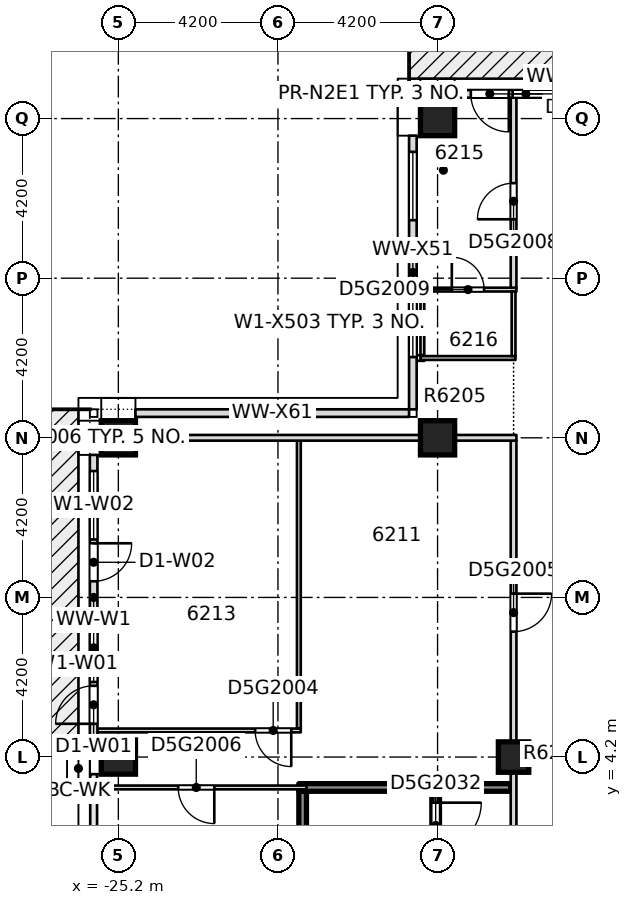
"""IFC4 building model, lengths in metres.
Left out: names, types, materials, properties, quantities, classifications, styles, units other than length and angle.
Written with IfcOpenShell. Run it as: python <this file> out.ifc"""

import sys

from ifc_helpers import new_model, si_unit, direction, frame, frame_2d, origin, origin_2d, place, context, subcontext, project, spatial, rectangle, extrude, element, fill, save


model = new_model("IFC4")
c1 = context("Model", 3, precision=1e-05, world=origin(), true_north=direction((0.0, 1.0)))
c2 = subcontext(c1, "Body", "Model", "MODEL_VIEW")
j1 = project(units=[si_unit("LENGTHUNIT", "METRE"), si_unit("PLANEANGLEUNIT", "RADIAN")], contexts=[c1])
p1 = place(None, origin())
s1 = spatial("IfcSite", under=j1, at=p1, CompositionType="ELEMENT")
p2 = place(p1, origin())
s2 = spatial("IfcBuilding", under=s1, at=p2, CompositionType="ELEMENT")
p3 = place(p2, frame((0.0, 0.0, 237.25)))
s3 = spatial("IfcBuildingStorey", under=s2, at=p3, CompositionType="ELEMENT", Elevation=237.25)
for number, where, z_axis, x_axis in (
    (1, (-25.2, 4.2, -0.4), (0.0, 0.0, 1.0), (1.0, 0.0, 0.0)),
    (2, (-25.2, 12.6, -0.4), (0.0, 0.0, 1.0), (1.0, 0.0, 0.0)),
    (3, (-16.8, 12.6, -0.4), (0.0, 0.0, 1.0), (1.0, 0.0, 0.0)),
    (4, (-16.8, 21.0, -0.4), (0.0, 0.0, 1.0), (1.0, 0.0, 0.0)),
):
    element("IfcColumn", number, at=place(p3, frame(where, z_axis=z_axis, x_axis=x_axis)), inside=s3, PredefinedType="COLUMN", context=c2, shape_type="SweptSolid", body=[
        extrude(rectangle(XDim=0.9, YDim=0.9, at=origin_2d()), origin(), (0.0, 0.0, 1.0), 3.45),
    ])
p4 = place(p3, frame((-14.8, 4.2, -0.4), z_axis=(0.0, 0.0, 1.0), x_axis=(1.0, 0.0, 0.0)))
e5 = element("IfcColumn", 5, at=p4, inside=s3, PredefinedType="COLUMN", context=c2, shape_type="SweptSolid", body=[
    extrude(rectangle(XDim=0.8, YDim=0.8, at=origin_2d()), origin(), (0.0, 0.0, 1.0), 3.45),
])
p5 = place(p3, frame((-25.75, 3.4, 0.0), z_axis=(0.0, 0.0, 1.0), x_axis=(1.0, 0.0, 0.0)))
e6 = element("IfcWall", 6, at=p5, inside=s3, PredefinedType="PARTITIONING", context=c2, shape_type="SweptSolid", body=[
    extrude(rectangle(XDim=5.5, YDim=0.1, at=frame_2d((2.75, 0.0))), origin(), (0.0, 0.0, 1.0), 3.05),
])
p6 = place(p5, frame((2.125, 0.0, 0.0)))
e7 = element("IfcOpeningElement", 7, at=p6, cuts=e6, PredefinedType="OPENING", context=c2, shape_type="SweptSolid", body=[
    extrude(rectangle(XDim=0.95, YDim=2.1, at=frame_2d((0.475, 1.05))), frame((0.0, 0.06, 0.0), z_axis=(0.0, -1.0, 0.0), x_axis=(1.0, 0.0, 0.0)), (0.0, 0.0, 1.0), 0.12),
])
p7 = place(p3, frame((-20.45, 3.4, 0.0), z_axis=(0.0, 0.0, 1.0), x_axis=(1.0, 0.0, 0.0)))
e8 = element("IfcWall", 8, at=p7, inside=s3, PredefinedType="SOLIDWALL", context=c2, shape_type="SweptSolid", body=[
    extrude(rectangle(XDim=5.575, YDim=0.2, at=frame_2d((2.788, 0.0))), origin(), (0.0, 0.0, 1.0), 3.05),
])
p8 = place(p3, frame((-25.75, 4.9, 0.0), z_axis=(0.0, 0.0, 1.0), x_axis=(1.0, 0.0, 0.0)))
e9 = element("IfcWall", 9, at=p8, inside=s3, PredefinedType="PARTITIONING", context=c2, shape_type="SweptSolid", body=[
    extrude(rectangle(XDim=5.35, YDim=0.1, at=frame_2d((2.675, 0.0))), origin(), (0.0, 0.0, 1.0), 3.05),
])
p9 = place(p8, frame((4.15, 0.0, 0.0)))
e10 = element("IfcOpeningElement", 10, at=p9, cuts=e9, PredefinedType="OPENING", context=c2, shape_type="SweptSolid", body=[
    extrude(rectangle(XDim=0.95, YDim=2.1, at=frame_2d((0.475, 1.05))), frame((0.0, 0.06, 0.0), z_axis=(0.0, -1.0, 0.0), x_axis=(1.0, 0.0, 0.0)), (0.0, 0.0, 1.0), 0.12),
])
p10 = place(p3, frame((-25.75, 12.6, 0.0), z_axis=(0.0, 0.0, 1.0), x_axis=(1.0, 0.0, 0.0)))
e11 = element("IfcWall", 11, at=p10, inside=s3, PredefinedType="PARTITIONING", context=c2, shape_type="SweptSolid", body=[
    extrude(rectangle(XDim=1.0, YDim=0.15, at=frame_2d((0.5, 0.0))), origin(), (0.0, 0.0, 1.0), 3.05),
])
p11 = place(p3, frame((-17.35, 14.7, 0.0), z_axis=(0.0, 0.0, 1.0), x_axis=(1.0, 0.0, 0.0)))
e12 = element("IfcWall", 12, at=p11, inside=s3, PredefinedType="PARTITIONING", context=c2, shape_type="SweptSolid", body=[
    extrude(rectangle(XDim=0.2, YDim=0.15, at=frame_2d((0.1, 0.0))), origin(), (0.0, 0.0, 1.0), 3.05),
])
p12 = place(p3, frame((-17.25, 14.7, 0.0), z_axis=(0.0, 0.0, 1.0), x_axis=(1.0, 0.0, 0.0)))
e13 = element("IfcWall", 13, at=p12, inside=s3, PredefinedType="PARTITIONING", context=c2, shape_type="SweptSolid", body=[
    extrude(rectangle(XDim=2.5, YDim=0.1, at=frame_2d((1.25, 0.0))), origin(), (0.0, 0.0, 1.0), 3.05),
])
p13 = place(p3, frame((-17.25, 16.5, 0.0), z_axis=(0.0, 0.0, 1.0), x_axis=(1.0, 0.0, 0.0)))
e14 = element("IfcWall", 14, at=p13, inside=s3, PredefinedType="PARTITIONING", context=c2, shape_type="SweptSolid", body=[
    extrude(rectangle(XDim=2.525, YDim=0.1, at=frame_2d((1.262, 0.0))), origin(), (0.0, 0.0, 1.0), 3.05),
])
p14 = place(p13, frame((0.825, 0.0, 0.0)))
e15 = element("IfcOpeningElement", 15, at=p14, cuts=e14, PredefinedType="OPENING", context=c2, shape_type="SweptSolid", body=[
    extrude(rectangle(XDim=0.85, YDim=2.1, at=frame_2d((0.425, 1.05))), frame((0.0, 0.06, 0.0), z_axis=(0.0, -1.0, 0.0), x_axis=(1.0, 0.0, 0.0)), (0.0, 0.0, 1.0), 0.12),
])
p15 = place(p3, frame((-20.45, 4.95, 0.0), z_axis=(0.0, 0.0, 1.0), x_axis=(0.0, 1.0, 0.0)))
e16 = element("IfcWall", 16, at=p15, inside=s3, PredefinedType="PARTITIONING", context=c2, shape_type="SweptSolid", body=[
    extrude(rectangle(XDim=7.575, YDim=0.1, at=frame_2d((3.788, 0.0))), origin(), (0.0, 0.0, 1.0), 3.05),
])
p16 = place(p3, frame((-20.35, 0.07, 0.0), z_axis=(0.0, 0.0, 1.0), x_axis=(0.0, 1.0, 0.0)))
e17 = element("IfcWall", 17, at=p16, inside=s3, PredefinedType="SOLIDWALL", context=c2, shape_type="SweptSolid", body=[
    extrude(rectangle(XDim=3.23, YDim=0.2, at=frame_2d((1.615, 0.0))), origin(), (0.0, 0.0, 1.0), 3.05),
])
p17 = place(p3, frame((-17.2, 14.775, 0.0), z_axis=(0.0, 0.0, 1.0), x_axis=(0.0, 1.0, 0.0)))
e18 = element("IfcWall", 18, at=p17, inside=s3, PredefinedType="PARTITIONING", context=c2, shape_type="SweptSolid", body=[
    extrude(rectangle(XDim=1.675, YDim=0.1, at=frame_2d((0.837, 0.0))), origin(), (0.0, 0.0, 1.0), 3.05),
])
p18 = place(p3, frame((-16.85, -3.3, 0.0), z_axis=(0.0, 0.0, 1.0), x_axis=(0.0, 1.0, 0.0)))
e19 = element("IfcWall", 19, at=p18, inside=s3, PredefinedType="SOLIDWALL", context=c2, shape_type="SweptSolid", body=[
    extrude(rectangle(XDim=6.6, YDim=0.2, at=frame_2d((3.3, 0.0))), origin(), (0.0, 0.0, 1.0), 3.05),
])
p19 = place(p18, frame((5.1, 0.0, 0.0)))
e20 = element("IfcOpeningElement", 20, at=p19, cuts=e19, PredefinedType="OPENING", context=c2, shape_type="SweptSolid", body=[
    extrude(rectangle(XDim=1.2, YDim=2.1, at=frame_2d((0.6, 1.05))), frame((0.0, 0.11, 0.0), z_axis=(0.0, -1.0, 0.0), x_axis=(1.0, 0.0, 0.0)), (0.0, 0.0, 1.0), 0.22),
])
p20 = place(p3, frame((-14.8, -5.223, 0.0), z_axis=(0.0, 0.0, 1.0), x_axis=(0.0, 1.0, 0.0)))
e21 = element("IfcWall", 21, at=p20, inside=s3, PredefinedType="PARTITIONING", context=c2, shape_type="SweptSolid", body=[
    extrude(rectangle(XDim=17.748, YDim=0.15, at=frame_2d((8.874, 0.0))), origin(), (0.0, 0.0, 1.0), 3.05),
])
p21 = place(p20, frame((12.723, 0.0, 0.0)))
e22 = element("IfcOpeningElement", 22, at=p21, cuts=e21, PredefinedType="OPENING", context=c2, shape_type="SweptSolid", body=[
    extrude(rectangle(XDim=1.0, YDim=2.1, at=frame_2d((0.5, 1.05))), frame((0.0, 0.085, 0.0), z_axis=(0.0, -1.0, 0.0), x_axis=(1.0, 0.0, 0.0)), (0.0, 0.0, 1.0), 0.17),
])
p22 = place(p20, frame((4.673, 0.0, 0.0)))
e23 = element("IfcOpeningElement", 23, at=p22, cuts=e21, PredefinedType="OPENING", context=c2, shape_type="SweptSolid", body=[
    extrude(rectangle(XDim=1.1, YDim=2.1, at=frame_2d((0.55, 1.05))), frame((0.0, 0.085, 0.0), z_axis=(0.0, -1.0, 0.0), x_axis=(1.0, 0.0, 0.0)), (0.0, 0.0, 1.0), 0.17),
])
p23 = place(p3, frame((-14.8, 14.75, 0.0), z_axis=(0.0, 0.0, 1.0), x_axis=(0.0, 1.0, 0.0)))
e24 = element("IfcWall", 24, at=p23, inside=s3, PredefinedType="PARTITIONING", context=c2, shape_type="SweptSolid", body=[
    extrude(rectangle(XDim=1.7, YDim=0.1, at=frame_2d((0.85, 0.0))), origin(), (0.0, 0.0, 1.0), 3.05),
])
p24 = place(p3, frame((-14.8, 16.55, 0.0), z_axis=(0.0, 0.0, 1.0), x_axis=(0.0, 1.0, 0.0)))
e25 = element("IfcWall", 25, at=p24, inside=s3, PredefinedType="PARTITIONING", context=c2, shape_type="SweptSolid", body=[
    extrude(rectangle(XDim=5.0, YDim=0.15, at=frame_2d((2.5, 0.0))), origin(), (0.0, 0.0, 1.0), 3.05),
])
p25 = place(p24, frame((1.8, 0.0, 0.0)))
e26 = element("IfcOpeningElement", 26, at=p25, cuts=e25, PredefinedType="OPENING", context=c2, shape_type="SweptSolid", body=[
    extrude(rectangle(XDim=0.95, YDim=2.1, at=frame_2d((0.475, 1.05))), frame((0.0, 0.085, 0.0), z_axis=(0.0, -1.0, 0.0), x_axis=(1.0, 0.0, 0.0)), (0.0, 0.0, 1.0), 0.17),
])
p26 = place(p3, frame((-12.6, 21.65, 0.0), z_axis=(0.0, 0.0, 1.0), x_axis=(-1.0, 0.0, 0.0)))
e27 = element("IfcWall", 27, at=p26, inside=s3, PredefinedType="STANDARD", context=c2, shape_type="SweptSolid", body=[
    extrude(rectangle(XDim=3.75, YDim=0.2, at=frame_2d((1.875, 0.0))), origin(), (0.0, 0.0, 1.0), 3.05),
])
p27 = place(p26, frame((0.425, 0.0, 0.2)))
e28 = element("IfcOpeningElement", 28, at=p27, cuts=e27, PredefinedType="OPENING", context=c2, shape_type="SweptSolid", body=[
    extrude(rectangle(XDim=1.8, YDim=2.65, at=frame_2d((0.9, 1.325))), frame((0.0, 0.11, 0.0), z_axis=(0.0, -1.0, 0.0), x_axis=(1.0, 0.0, 0.0)), (0.0, 0.0, 1.0), 0.22),
])
p28 = place(p26, frame((2.325, 0.0, 0.0)))
e29 = element("IfcOpeningElement", 29, at=p28, cuts=e27, PredefinedType="OPENING", context=c2, shape_type="SweptSolid", body=[
    extrude(rectangle(XDim=1.0, YDim=2.4, at=frame_2d((0.5, 1.2))), frame((0.0, 0.11, 0.0), z_axis=(0.0, -1.0, 0.0), x_axis=(1.0, 0.0, 0.0)), (0.0, 0.0, 1.0), 0.22),
])
p29 = place(p3, frame((-17.45, 20.55, 0.0), z_axis=(0.0, 0.0, 1.0), x_axis=(0.0, -1.0, 0.0)))
e30 = element("IfcWall", 30, at=p29, inside=s3, PredefinedType="STANDARD", context=c2, shape_type="SweptSolid", body=[
    extrude(rectangle(XDim=7.2, YDim=0.2, at=frame_2d((3.6, 0.0))), origin(), (0.0, 0.0, 1.0), 3.05),
])
p30 = place(p29, frame((4.025, 0.0, 0.2)))
e31 = element("IfcOpeningElement", 31, at=p30, cuts=e30, PredefinedType="OPENING", context=c2, shape_type="SweptSolid", body=[
    extrude(rectangle(XDim=1.8, YDim=2.65, at=frame_2d((0.9, 1.325))), frame((0.0, 0.11, 0.0), z_axis=(0.0, -1.0, 0.0), x_axis=(1.0, 0.0, 0.0)), (0.0, 0.0, 1.0), 0.22),
])
p31 = place(p29, frame((0.425, 0.0, 0.2)))
e32 = element("IfcOpeningElement", 32, at=p31, cuts=e30, PredefinedType="OPENING", context=c2, shape_type="SweptSolid", body=[
    extrude(rectangle(XDim=1.8, YDim=2.65, at=frame_2d((0.9, 1.325))), frame((0.0, 0.11, 0.0), z_axis=(0.0, -1.0, 0.0), x_axis=(1.0, 0.0, 0.0)), (0.0, 0.0, 1.0), 0.22),
])
p32 = place(p3, frame((-17.55, 13.25, 0.0), z_axis=(0.0, 0.0, 1.0), x_axis=(-1.0, 0.0, 0.0)))
e33 = element("IfcWall", 33, at=p32, inside=s3, PredefinedType="STANDARD", context=c2, shape_type="SweptSolid", body=[
    extrude(rectangle(XDim=7.2, YDim=0.2, at=frame_2d((3.6, 0.0))), origin(), (0.0, 0.0, 1.0), 3.05),
])
p33 = place(p3, frame((-25.85, 12.15, 0.0), z_axis=(0.0, 0.0, 1.0), x_axis=(0.0, -1.0, 0.0)))
e34 = element("IfcWall", 34, at=p33, inside=s3, PredefinedType="STANDARD", context=c2, shape_type="SweptSolid", body=[
    extrude(rectangle(XDim=7.5, YDim=0.2, at=frame_2d((3.75, 0.0))), origin(), (0.0, 0.0, 1.0), 3.05),
])
p34 = place(p33, frame((4.175, 0.0, 0.2)))
e35 = element("IfcOpeningElement", 35, at=p34, cuts=e34, PredefinedType="OPENING", context=c2, shape_type="SweptSolid", body=[
    extrude(rectangle(XDim=1.8, YDim=2.65, at=frame_2d((0.9, 1.325))), frame((0.0, 0.11, 0.0), z_axis=(0.0, -1.0, 0.0), x_axis=(1.0, 0.0, 0.0)), (0.0, 0.0, 1.0), 0.22),
])
p35 = place(p33, frame((6.075, 0.0, 0.0)))
e36 = element("IfcOpeningElement", 36, at=p35, cuts=e34, PredefinedType="OPENING", context=c2, shape_type="SweptSolid", body=[
    extrude(rectangle(XDim=1.0, YDim=2.4, at=frame_2d((0.5, 1.2))), frame((0.0, 0.11, 0.0), z_axis=(0.0, -1.0, 0.0), x_axis=(1.0, 0.0, 0.0)), (0.0, 0.0, 1.0), 0.22),
])
p36 = place(p33, frame((0.425, 0.0, 0.2)))
e37 = element("IfcOpeningElement", 37, at=p36, cuts=e34, PredefinedType="OPENING", context=c2, shape_type="SweptSolid", body=[
    extrude(rectangle(XDim=1.8, YDim=2.65, at=frame_2d((0.9, 1.325))), frame((0.0, 0.11, 0.0), z_axis=(0.0, -1.0, 0.0), x_axis=(1.0, 0.0, 0.0)), (0.0, 0.0, 1.0), 0.22),
])
p37 = place(p33, frame((2.325, 0.0, 0.0)))
e38 = element("IfcOpeningElement", 38, at=p37, cuts=e34, PredefinedType="OPENING", context=c2, shape_type="SweptSolid", body=[
    extrude(rectangle(XDim=1.0, YDim=2.4, at=frame_2d((0.5, 1.2))), frame((0.0, 0.11, 0.0), z_axis=(0.0, -1.0, 0.0), x_axis=(1.0, 0.0, 0.0)), (0.0, 0.0, 1.0), 0.22),
])
p38 = place(p3, frame((-24.75, 12.6, 0.0), z_axis=(0.0, 0.0, 1.0), x_axis=(1.0, 0.0, 0.0)))
e39 = element("IfcWall", 39, at=p38, inside=s3, PredefinedType="PARTITIONING", context=c2, shape_type="SweptSolid", body=[
    extrude(rectangle(XDim=7.5, YDim=0.15, at=frame_2d((3.75, 0.0))), origin(), (0.0, 0.0, 1.0), 2.5),
])
p39 = place(p3, frame((-17.25, 12.6, 0.0), z_axis=(0.0, 0.0, 1.0), x_axis=(1.0, 0.0, 0.0)))
e40 = element("IfcWall", 40, at=p39, inside=s3, PredefinedType="PARTITIONING", context=c2, shape_type="SweptSolid", body=[
    extrude(rectangle(XDim=2.525, YDim=0.15, at=frame_2d((1.262, 0.0))), origin(), (0.0, 0.0, 1.0), 3.05),
])
p40 = place(p9, origin())
e41 = element("IfcDoor", 41, at=p40, inside=s3, OperationType="SINGLE_SWING_LEFT", PredefinedType="DOOR", context=c2, shape_type="SweptSolid", body=[
    extrude(rectangle(XDim=0.95, YDim=2.1, at=frame_2d((0.475, 1.05))), frame((0.0, 0.025, 0.0), z_axis=(0.0, -1.0, 0.0), x_axis=(1.0, 0.0, 0.0)), (0.0, 0.0, 1.0), 0.05),
])
fill(e10, e41)
p41 = place(p21, origin())
e42 = element("IfcDoor", 42, at=p41, inside=s3, OperationType="SINGLE_SWING_RIGHT", PredefinedType="DOOR", context=c2, shape_type="SweptSolid", body=[
    extrude(rectangle(XDim=1.0, YDim=2.1, at=frame_2d((0.5, 1.05))), frame((0.0, 0.025, 0.0), z_axis=(0.0, -1.0, 0.0), x_axis=(1.0, 0.0, 0.0)), (0.0, 0.0, 1.0), 0.05),
])
fill(e22, e42)
p42 = place(p6, origin())
e43 = element("IfcDoor", 43, at=p42, inside=s3, OperationType="SINGLE_SWING_LEFT", PredefinedType="DOOR", context=c2, shape_type="SweptSolid", body=[
    extrude(rectangle(XDim=0.95, YDim=2.1, at=frame_2d((0.475, 1.05))), frame((0.0, 0.025, 0.0), z_axis=(0.0, -1.0, 0.0), x_axis=(1.0, 0.0, 0.0)), (0.0, 0.0, 1.0), 0.05),
])
fill(e7, e43)
p43 = place(p25, origin())
e44 = element("IfcDoor", 44, at=p43, inside=s3, OperationType="SINGLE_SWING_RIGHT", PredefinedType="DOOR", context=c2, shape_type="SweptSolid", body=[
    extrude(rectangle(XDim=0.95, YDim=2.1, at=frame_2d((0.475, 1.05))), frame((0.0, 0.025, 0.0), z_axis=(0.0, -1.0, 0.0), x_axis=(1.0, 0.0, 0.0)), (0.0, 0.0, 1.0), 0.05),
])
fill(e26, e44)
p44 = place(p14, origin())
e45 = element("IfcDoor", 45, at=p44, inside=s3, OperationType="SINGLE_SWING_RIGHT", PredefinedType="DOOR", context=c2, shape_type="SweptSolid", body=[
    extrude(rectangle(XDim=0.85, YDim=2.1, at=frame_2d((0.425, 1.05))), frame((0.0, 0.025, 0.0), z_axis=(0.0, -1.0, 0.0), x_axis=(1.0, 0.0, 0.0)), (0.0, 0.0, 1.0), 0.05),
])
fill(e15, e45)
p45 = place(p19, origin())
e46 = element("IfcDoor", 46, at=p45, inside=s3, OperationType="SINGLE_SWING_RIGHT", PredefinedType="DOOR", context=c2, shape_type="SweptSolid", body=[
    extrude(rectangle(XDim=1.2, YDim=2.1, at=frame_2d((0.6, 1.05))), frame((0.0, 0.025, 0.0), z_axis=(0.0, -1.0, 0.0), x_axis=(1.0, 0.0, 0.0)), (0.0, 0.0, 1.0), 0.05),
])
fill(e20, e46)
p46 = place(p27, origin())
e47 = element("IfcWindow", 47, at=p46, inside=s3, PartitioningType="SINGLE_PANEL", PredefinedType="WINDOW", context=c2, shape_type="SweptSolid", body=[
    extrude(rectangle(XDim=1.8, YDim=2.65, at=frame_2d((0.9, 1.325))), frame((0.0, 0.03, 0.0), z_axis=(0.0, -1.0, 0.0), x_axis=(1.0, 0.0, 0.0)), (0.0, 0.0, 1.0), 0.06),
])
fill(e28, e47)
p47 = place(p28, origin())
e48 = element("IfcDoor", 48, at=p47, inside=s3, OperationType="SINGLE_SWING_LEFT", PredefinedType="DOOR", context=c2, shape_type="SweptSolid", body=[
    extrude(rectangle(XDim=1.0, YDim=2.4, at=frame_2d((0.5, 1.2))), frame((0.0, 0.025, 0.0), z_axis=(0.0, -1.0, 0.0), x_axis=(1.0, 0.0, 0.0)), (0.0, 0.0, 1.0), 0.05),
])
fill(e29, e48)
p48 = place(p30, origin())
e49 = element("IfcWindow", 49, at=p48, inside=s3, PartitioningType="SINGLE_PANEL", PredefinedType="WINDOW", context=c2, shape_type="SweptSolid", body=[
    extrude(rectangle(XDim=1.8, YDim=2.65, at=frame_2d((0.9, 1.325))), frame((0.0, 0.03, 0.0), z_axis=(0.0, -1.0, 0.0), x_axis=(1.0, 0.0, 0.0)), (0.0, 0.0, 1.0), 0.06),
])
fill(e31, e49)
p49 = place(p31, origin())
e50 = element("IfcWindow", 50, at=p49, inside=s3, PartitioningType="SINGLE_PANEL", PredefinedType="WINDOW", context=c2, shape_type="SweptSolid", body=[
    extrude(rectangle(XDim=1.8, YDim=2.65, at=frame_2d((0.9, 1.325))), frame((0.0, 0.03, 0.0), z_axis=(0.0, -1.0, 0.0), x_axis=(1.0, 0.0, 0.0)), (0.0, 0.0, 1.0), 0.06),
])
fill(e32, e50)
p50 = place(p34, origin())
e51 = element("IfcWindow", 51, at=p50, inside=s3, PartitioningType="SINGLE_PANEL", PredefinedType="WINDOW", context=c2, shape_type="SweptSolid", body=[
    extrude(rectangle(XDim=1.8, YDim=2.65, at=frame_2d((0.9, 1.325))), frame((0.0, 0.03, 0.0), z_axis=(0.0, -1.0, 0.0), x_axis=(1.0, 0.0, 0.0)), (0.0, 0.0, 1.0), 0.06),
])
fill(e35, e51)
p51 = place(p35, origin())
e52 = element("IfcDoor", 52, at=p51, inside=s3, OperationType="SINGLE_SWING_LEFT", PredefinedType="DOOR", context=c2, shape_type="SweptSolid", body=[
    extrude(rectangle(XDim=1.0, YDim=2.4, at=frame_2d((0.5, 1.2))), frame((0.0, 0.025, 0.0), z_axis=(0.0, -1.0, 0.0), x_axis=(1.0, 0.0, 0.0)), (0.0, 0.0, 1.0), 0.05),
])
fill(e36, e52)
p52 = place(p36, origin())
e53 = element("IfcWindow", 53, at=p52, inside=s3, PartitioningType="SINGLE_PANEL", PredefinedType="WINDOW", context=c2, shape_type="SweptSolid", body=[
    extrude(rectangle(XDim=1.8, YDim=2.65, at=frame_2d((0.9, 1.325))), frame((0.0, 0.03, 0.0), z_axis=(0.0, -1.0, 0.0), x_axis=(1.0, 0.0, 0.0)), (0.0, 0.0, 1.0), 0.06),
])
fill(e37, e53)
p53 = place(p37, origin())
e54 = element("IfcDoor", 54, at=p53, inside=s3, OperationType="SINGLE_SWING_LEFT", PredefinedType="DOOR", context=c2, shape_type="SweptSolid", body=[
    extrude(rectangle(XDim=1.0, YDim=2.4, at=frame_2d((0.5, 1.2))), frame((0.0, 0.025, 0.0), z_axis=(0.0, -1.0, 0.0), x_axis=(1.0, 0.0, 0.0)), (0.0, 0.0, 1.0), 0.05),
])
fill(e38, e54)
save(model, sys.argv[1])
